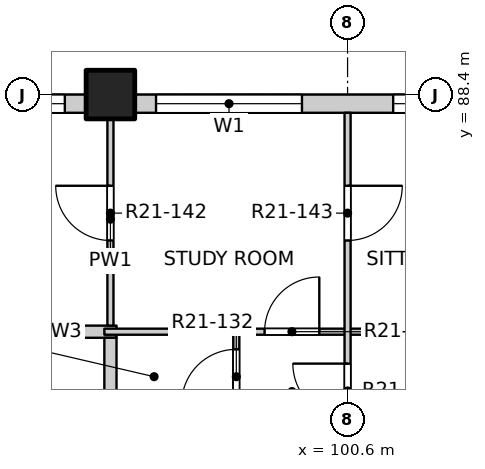
"""IFC4 building model, lengths in metres.
Left out: names, types, materials, properties, quantities, classifications, styles, units other than length and angle.
Written with IfcOpenShell. Run it as: python <this file> out.ifc"""

import sys

from ifc_helpers import new_model, si_unit, direction, frame, frame_2d, origin, origin_2d, place, context, subcontext, project, spatial, rectangle, extrude, element, fill, save


model = new_model("IFC4")
c1 = context("Model", 3, precision=1e-05, world=origin(), true_north=direction((0.0, 1.0)))
c2 = subcontext(c1, "Body", "Model", "MODEL_VIEW")
j1 = project(units=[si_unit("LENGTHUNIT", "METRE"), si_unit("PLANEANGLEUNIT", "RADIAN")], contexts=[c1])
p1 = place(None, origin())
s1 = spatial("IfcSite", under=j1, at=p1, CompositionType="ELEMENT")
p2 = place(p1, origin())
s2 = spatial("IfcBuilding", under=s1, at=p2, CompositionType="ELEMENT")
p3 = place(p2, frame((0.0, 0.0, 221.1)))
s3 = spatial("IfcBuildingStorey", under=s2, at=p3, CompositionType="ELEMENT", Elevation=221.1)
p4 = place(p3, frame((96.7, 88.4, -0.25), z_axis=(0.0, 0.0, 1.0), x_axis=(1.0, 0.0, 0.0)))
e1 = element("IfcColumn", 1, at=p4, inside=s3, PredefinedType="COLUMN", context=c2, shape_type="SweptSolid", body=[
    extrude(rectangle(XDim=0.8, YDim=0.8, at=origin_2d()), origin(), (0.0, 0.0, 1.0), 3.4),
])
p5 = place(p3, frame((73.7, 88.25, 0.0), z_axis=(0.0, 0.0, 1.0), x_axis=(1.0, 0.0, 0.0)))
e2 = element("IfcWall", 2, at=p5, inside=s3, PredefinedType="SOLIDWALL", context=c2, shape_type="SweptSolid", body=[
    extrude(rectangle(XDim=22.6, YDim=0.3, at=frame_2d((11.3, 0.0))), origin(), (0.0, 0.0, 1.0), 2.7),
])
p6 = place(p5, frame((0.35, 0.0, 0.9)))
e3 = element("IfcOpeningElement", 3, at=p6, cuts=e2, PredefinedType="OPENING", context=c2, shape_type="SweptSolid", body=[
    extrude(rectangle(XDim=2.4, YDim=1.8, at=frame_2d((1.2, 0.9))), frame((0.0, 0.16, 0.0), z_axis=(0.0, -1.0, 0.0), x_axis=(1.0, 0.0, 0.0)), (0.0, 0.0, 1.0), 0.32),
])
p7 = place(p5, frame((4.25, 0.0, 0.9)))
e4 = element("IfcOpeningElement", 4, at=p7, cuts=e2, PredefinedType="OPENING", context=c2, shape_type="SweptSolid", body=[
    extrude(rectangle(XDim=2.4, YDim=1.8, at=frame_2d((1.2, 0.9))), frame((0.0, 0.16, 0.0), z_axis=(0.0, -1.0, 0.0), x_axis=(1.0, 0.0, 0.0)), (0.0, 0.0, 1.0), 0.32),
])
p8 = place(p5, frame((8.15, 0.0, 0.9)))
e5 = element("IfcOpeningElement", 5, at=p8, cuts=e2, PredefinedType="OPENING", context=c2, shape_type="SweptSolid", body=[
    extrude(rectangle(XDim=2.4, YDim=1.8, at=frame_2d((1.2, 0.9))), frame((0.0, 0.16, 0.0), z_axis=(0.0, -1.0, 0.0), x_axis=(1.0, 0.0, 0.0)), (0.0, 0.0, 1.0), 0.32),
])
p9 = place(p5, frame((12.05, 0.0, 0.9)))
e6 = element("IfcOpeningElement", 6, at=p9, cuts=e2, PredefinedType="OPENING", context=c2, shape_type="SweptSolid", body=[
    extrude(rectangle(XDim=2.4, YDim=1.8, at=frame_2d((1.2, 0.9))), frame((0.0, 0.16, 0.0), z_axis=(0.0, -1.0, 0.0), x_axis=(1.0, 0.0, 0.0)), (0.0, 0.0, 1.0), 0.32),
])
p10 = place(p5, frame((15.95, 0.0, 0.9)))
e7 = element("IfcOpeningElement", 7, at=p10, cuts=e2, PredefinedType="OPENING", context=c2, shape_type="SweptSolid", body=[
    extrude(rectangle(XDim=2.4, YDim=1.8, at=frame_2d((1.2, 0.9))), frame((0.0, 0.16, 0.0), z_axis=(0.0, -1.0, 0.0), x_axis=(1.0, 0.0, 0.0)), (0.0, 0.0, 1.0), 0.32),
])
p11 = place(p5, frame((19.85, 0.0, 0.9)))
e8 = element("IfcOpeningElement", 8, at=p11, cuts=e2, PredefinedType="OPENING", context=c2, shape_type="SweptSolid", body=[
    extrude(rectangle(XDim=2.4, YDim=1.8, at=frame_2d((1.2, 0.9))), frame((0.0, 0.16, 0.0), z_axis=(0.0, -1.0, 0.0), x_axis=(1.0, 0.0, 0.0)), (0.0, 0.0, 1.0), 0.32),
])
p12 = place(p3, frame((97.1, 88.25, 0.0), z_axis=(0.0, 0.0, 1.0), x_axis=(1.0, 0.0, 0.0)))
e9 = element("IfcWall", 9, at=p12, inside=s3, PredefinedType="SOLIDWALL", context=c2, shape_type="SweptSolid", body=[
    extrude(rectangle(XDim=7.4, YDim=0.3, at=frame_2d((3.7, 0.0))), origin(), (0.0, 0.0, 1.0), 2.7),
])
p13 = place(p12, frame((0.35, 0.0, 0.9)))
e10 = element("IfcOpeningElement", 10, at=p13, cuts=e9, PredefinedType="OPENING", context=c2, shape_type="SweptSolid", body=[
    extrude(rectangle(XDim=2.4, YDim=1.8, at=frame_2d((1.2, 0.9))), frame((0.0, 0.16, 0.0), z_axis=(0.0, -1.0, 0.0), x_axis=(1.0, 0.0, 0.0)), (0.0, 0.0, 1.0), 0.32),
])
p14 = place(p12, frame((4.25, 0.0, 0.9)))
e11 = element("IfcOpeningElement", 11, at=p14, cuts=e9, PredefinedType="OPENING", context=c2, shape_type="SweptSolid", body=[
    extrude(rectangle(XDim=2.4, YDim=1.8, at=frame_2d((1.2, 0.9))), frame((0.0, 0.16, 0.0), z_axis=(0.0, -1.0, 0.0), x_axis=(1.0, 0.0, 0.0)), (0.0, 0.0, 1.0), 0.32),
])
p15 = place(p3, frame((94.95, 84.5, 0.0), z_axis=(0.0, 0.0, 1.0), x_axis=(1.0, 0.0, 0.0)))
e12 = element("IfcWall", 12, at=p15, inside=s3, PredefinedType="PARTITIONING", context=c2, shape_type="SweptSolid", body=[
    extrude(rectangle(XDim=1.85, YDim=0.2, at=frame_2d((0.925, 0.0))), origin(), (0.0, 0.0, 1.0), 3.15),
])
p16 = place(p3, frame((96.6, 84.5, 0.0), z_axis=(0.0, 0.0, 1.0), x_axis=(1.0, 0.0, 0.0)))
e13 = element("IfcWall", 13, at=p16, inside=s3, PredefinedType="PARTITIONING", context=c2, shape_type="SweptSolid", body=[
    extrude(rectangle(XDim=11.5, YDim=0.1, at=frame_2d((5.75, 0.0))), origin(), (0.0, 0.0, 1.0), 3.15),
])
p17 = place(p16, frame((2.635, 0.0, 0.0)))
e14 = element("IfcOpeningElement", 14, at=p17, cuts=e13, PredefinedType="OPENING", context=c2, shape_type="SweptSolid", body=[
    extrude(rectangle(XDim=0.9, YDim=2.1, at=frame_2d((0.45, 1.05))), frame((0.0, 0.06, 0.0), z_axis=(0.0, -1.0, 0.0), x_axis=(1.0, 0.0, 0.0)), (0.0, 0.0, 1.0), 0.12),
])
p18 = place(p3, frame((96.7, 49.5, 0.0), z_axis=(0.0, 0.0, 1.0), x_axis=(0.0, 1.0, 0.0)))
e15 = element("IfcWall", 15, at=p18, inside=s3, PredefinedType="PARTITIONING", context=c2, shape_type="SweptSolid", body=[
    extrude(rectangle(XDim=34.9, YDim=0.2, at=frame_2d((17.45, 0.0))), origin(), (0.0, 0.0, 1.0), 3.15),
])
p19 = place(p18, frame((3.275, 0.0, 0.0)))
e16 = element("IfcOpeningElement", 16, at=p19, cuts=e15, PredefinedType="OPENING", context=c2, shape_type="SweptSolid", body=[
    extrude(rectangle(XDim=1.0, YDim=2.1, at=frame_2d((0.5, 1.05))), frame((0.0, 0.11, 0.0), z_axis=(0.0, -1.0, 0.0), x_axis=(1.0, 0.0, 0.0)), (0.0, 0.0, 1.0), 0.22),
])
p20 = place(p18, frame((10.825, 0.0, 0.0)))
e17 = element("IfcOpeningElement", 17, at=p20, cuts=e15, PredefinedType="OPENING", context=c2, shape_type="SweptSolid", body=[
    extrude(rectangle(XDim=1.0, YDim=2.1, at=frame_2d((0.5, 1.05))), frame((0.0, 0.11, 0.0), z_axis=(0.0, -1.0, 0.0), x_axis=(1.0, 0.0, 0.0)), (0.0, 0.0, 1.0), 0.22),
])
p21 = place(p18, frame((21.575, 0.0, 0.0)))
e18 = element("IfcOpeningElement", 18, at=p21, cuts=e15, PredefinedType="OPENING", context=c2, shape_type="SweptSolid", body=[
    extrude(rectangle(XDim=1.0, YDim=2.1, at=frame_2d((0.5, 1.05))), frame((0.0, 0.11, 0.0), z_axis=(0.0, -1.0, 0.0), x_axis=(1.0, 0.0, 0.0)), (0.0, 0.0, 1.0), 0.22),
])
p22 = place(p18, frame((30.575, 0.0, 0.0)))
e19 = element("IfcOpeningElement", 19, at=p22, cuts=e15, PredefinedType="OPENING", context=c2, shape_type="SweptSolid", body=[
    extrude(rectangle(XDim=1.0, YDim=2.1, at=frame_2d((0.5, 1.05))), frame((0.0, 0.11, 0.0), z_axis=(0.0, -1.0, 0.0), x_axis=(1.0, 0.0, 0.0)), (0.0, 0.0, 1.0), 0.22),
])
p23 = place(p3, frame((96.7, 84.6, 0.0), z_axis=(0.0, 0.0, 1.0), x_axis=(0.0, 1.0, 0.0)))
e20 = element("IfcWall", 20, at=p23, inside=s3, PredefinedType="PARTITIONING", context=c2, shape_type="SweptSolid", body=[
    extrude(rectangle(XDim=3.5, YDim=0.1, at=frame_2d((1.75, 0.0))), origin(), (0.0, 0.0, 1.0), 3.15),
])
p24 = place(p23, frame((1.4, 0.0, 0.0)))
e21 = element("IfcOpeningElement", 21, at=p24, cuts=e20, PredefinedType="OPENING", context=c2, shape_type="SweptSolid", body=[
    extrude(rectangle(XDim=0.9, YDim=2.1, at=frame_2d((0.45, 1.05))), frame((0.0, 0.06, 0.0), z_axis=(0.0, -1.0, 0.0), x_axis=(1.0, 0.0, 0.0)), (0.0, 0.0, 1.0), 0.12),
])
p25 = place(p3, frame((98.77, 79.95, 0.0), z_axis=(0.0, 0.0, 1.0), x_axis=(0.0, 1.0, 0.0)))
e22 = element("IfcWall", 22, at=p25, inside=s3, PredefinedType="PARTITIONING", context=c2, shape_type="SweptSolid", body=[
    extrude(rectangle(XDim=4.5, YDim=0.1, at=frame_2d((2.25, 0.0))), origin(), (0.0, 0.0, 1.0), 3.15),
])
p26 = place(p25, frame((0.435, 0.0, 0.0)))
e23 = element("IfcOpeningElement", 23, at=p26, cuts=e22, PredefinedType="OPENING", context=c2, shape_type="SweptSolid", body=[
    extrude(rectangle(XDim=0.9, YDim=2.1, at=frame_2d((0.45, 1.05))), frame((0.0, 0.06, 0.0), z_axis=(0.0, -1.0, 0.0), x_axis=(1.0, 0.0, 0.0)), (0.0, 0.0, 1.0), 0.12),
])
p27 = place(p25, frame((2.045, 0.0, 0.0)))
e24 = element("IfcOpeningElement", 24, at=p27, cuts=e22, PredefinedType="OPENING", context=c2, shape_type="SweptSolid", body=[
    extrude(rectangle(XDim=0.8, YDim=2.1, at=frame_2d((0.4, 1.05))), frame((0.0, 0.06, 0.0), z_axis=(0.0, -1.0, 0.0), x_axis=(1.0, 0.0, 0.0)), (0.0, 0.0, 1.0), 0.12),
])
p28 = place(p25, frame((3.36, 0.0, 0.0)))
e25 = element("IfcOpeningElement", 25, at=p28, cuts=e22, PredefinedType="OPENING", context=c2, shape_type="SweptSolid", body=[
    extrude(rectangle(XDim=0.9, YDim=2.1, at=frame_2d((0.45, 1.05))), frame((0.0, 0.06, 0.0), z_axis=(0.0, -1.0, 0.0), x_axis=(1.0, 0.0, 0.0)), (0.0, 0.0, 1.0), 0.12),
])
p29 = place(p3, frame((100.6, 41.9, 0.0), z_axis=(0.0, 0.0, 1.0), x_axis=(0.0, 1.0, 0.0)))
e26 = element("IfcWall", 26, at=p29, inside=s3, PredefinedType="PARTITIONING", context=c2, shape_type="SweptSolid", body=[
    extrude(rectangle(XDim=46.2, YDim=0.1, at=frame_2d((23.1, 0.0))), origin(), (0.0, 0.0, 1.0), 3.15),
])
p30 = place(p29, frame((1.2, 0.0, 0.0)))
e27 = element("IfcOpeningElement", 27, at=p30, cuts=e26, PredefinedType="OPENING", context=c2, shape_type="SweptSolid", body=[
    extrude(rectangle(XDim=0.9, YDim=2.1, at=frame_2d((0.45, 1.05))), frame((0.0, 0.06, 0.0), z_axis=(0.0, -1.0, 0.0), x_axis=(1.0, 0.0, 0.0)), (0.0, 0.0, 1.0), 0.12),
])
p31 = place(p29, frame((6.025, 0.0, 0.0)))
e28 = element("IfcOpeningElement", 28, at=p31, cuts=e26, PredefinedType="OPENING", context=c2, shape_type="SweptSolid", body=[
    extrude(rectangle(XDim=0.9, YDim=2.1, at=frame_2d((0.45, 1.05))), frame((0.0, 0.06, 0.0), z_axis=(0.0, -1.0, 0.0), x_axis=(1.0, 0.0, 0.0)), (0.0, 0.0, 1.0), 0.12),
])
p32 = place(p29, frame((9.0, 0.0, 0.0)))
e29 = element("IfcOpeningElement", 29, at=p32, cuts=e26, PredefinedType="OPENING", context=c2, shape_type="SweptSolid", body=[
    extrude(rectangle(XDim=0.9, YDim=2.1, at=frame_2d((0.45, 1.05))), frame((0.0, 0.06, 0.0), z_axis=(0.0, -1.0, 0.0), x_axis=(1.0, 0.0, 0.0)), (0.0, 0.0, 1.0), 0.12),
])
p33 = place(p29, frame((13.85, 0.0, 0.0)))
e30 = element("IfcOpeningElement", 30, at=p33, cuts=e26, PredefinedType="OPENING", context=c2, shape_type="SweptSolid", body=[
    extrude(rectangle(XDim=0.9, YDim=2.1, at=frame_2d((0.45, 1.05))), frame((0.0, 0.06, 0.0), z_axis=(0.0, -1.0, 0.0), x_axis=(1.0, 0.0, 0.0)), (0.0, 0.0, 1.0), 0.12),
])
p34 = place(p29, frame((16.8, 0.0, 0.0)))
e31 = element("IfcOpeningElement", 31, at=p34, cuts=e26, PredefinedType="OPENING", context=c2, shape_type="SweptSolid", body=[
    extrude(rectangle(XDim=0.9, YDim=2.1, at=frame_2d((0.45, 1.05))), frame((0.0, 0.06, 0.0), z_axis=(0.0, -1.0, 0.0), x_axis=(1.0, 0.0, 0.0)), (0.0, 0.0, 1.0), 0.12),
])
p35 = place(p29, frame((21.625, 0.0, 0.0)))
e32 = element("IfcOpeningElement", 32, at=p35, cuts=e26, PredefinedType="OPENING", context=c2, shape_type="SweptSolid", body=[
    extrude(rectangle(XDim=0.9, YDim=2.1, at=frame_2d((0.45, 1.05))), frame((0.0, 0.06, 0.0), z_axis=(0.0, -1.0, 0.0), x_axis=(1.0, 0.0, 0.0)), (0.0, 0.0, 1.0), 0.12),
])
p36 = place(p29, frame((24.6, 0.0, 0.0)))
e33 = element("IfcOpeningElement", 33, at=p36, cuts=e26, PredefinedType="OPENING", context=c2, shape_type="SweptSolid", body=[
    extrude(rectangle(XDim=0.9, YDim=2.1, at=frame_2d((0.45, 1.05))), frame((0.0, 0.06, 0.0), z_axis=(0.0, -1.0, 0.0), x_axis=(1.0, 0.0, 0.0)), (0.0, 0.0, 1.0), 0.12),
])
p37 = place(p29, frame((29.425, 0.0, 0.0)))
e34 = element("IfcOpeningElement", 34, at=p37, cuts=e26, PredefinedType="OPENING", context=c2, shape_type="SweptSolid", body=[
    extrude(rectangle(XDim=0.9, YDim=2.1, at=frame_2d((0.45, 1.05))), frame((0.0, 0.06, 0.0), z_axis=(0.0, -1.0, 0.0), x_axis=(1.0, 0.0, 0.0)), (0.0, 0.0, 1.0), 0.12),
])
p38 = place(p29, frame((33.375, 0.0, 0.0)))
e35 = element("IfcOpeningElement", 35, at=p38, cuts=e26, PredefinedType="OPENING", context=c2, shape_type="SweptSolid", body=[
    extrude(rectangle(XDim=0.9, YDim=2.1, at=frame_2d((0.45, 1.05))), frame((0.0, 0.06, 0.0), z_axis=(0.0, -1.0, 0.0), x_axis=(1.0, 0.0, 0.0)), (0.0, 0.0, 1.0), 0.12),
])
p39 = place(p29, frame((36.3, 0.0, 0.0)))
e36 = element("IfcOpeningElement", 36, at=p39, cuts=e26, PredefinedType="OPENING", context=c2, shape_type="SweptSolid", body=[
    extrude(rectangle(XDim=0.9, YDim=2.1, at=frame_2d((0.45, 1.05))), frame((0.0, 0.06, 0.0), z_axis=(0.0, -1.0, 0.0), x_axis=(1.0, 0.0, 0.0)), (0.0, 0.0, 1.0), 0.12),
])
p40 = place(p29, frame((41.175, 0.0, 0.0)))
e37 = element("IfcOpeningElement", 37, at=p40, cuts=e26, PredefinedType="OPENING", context=c2, shape_type="SweptSolid", body=[
    extrude(rectangle(XDim=0.9, YDim=2.1, at=frame_2d((0.45, 1.05))), frame((0.0, 0.06, 0.0), z_axis=(0.0, -1.0, 0.0), x_axis=(1.0, 0.0, 0.0)), (0.0, 0.0, 1.0), 0.12),
])
p41 = place(p29, frame((44.1, 0.0, 0.0)))
e38 = element("IfcOpeningElement", 38, at=p41, cuts=e26, PredefinedType="OPENING", context=c2, shape_type="SweptSolid", body=[
    extrude(rectangle(XDim=0.9, YDim=2.1, at=frame_2d((0.45, 1.05))), frame((0.0, 0.06, 0.0), z_axis=(0.0, -1.0, 0.0), x_axis=(1.0, 0.0, 0.0)), (0.0, 0.0, 1.0), 0.12),
])
p42 = place(p11, origin())
e39 = element("IfcWindow", 39, at=p42, inside=s3, PartitioningType="DOUBLE_PANEL_VERTICAL", PredefinedType="WINDOW", context=c2, shape_type="SweptSolid", body=[
    extrude(rectangle(XDim=2.4, YDim=1.8, at=frame_2d((1.2, 0.9))), frame((0.0, 0.03, 0.0), z_axis=(0.0, -1.0, 0.0), x_axis=(1.0, 0.0, 0.0)), (0.0, 0.0, 1.0), 0.06),
])
fill(e8, e39)
p43 = place(p13, origin())
e40 = element("IfcWindow", 40, at=p43, inside=s3, PartitioningType="DOUBLE_PANEL_VERTICAL", PredefinedType="WINDOW", context=c2, shape_type="SweptSolid", body=[
    extrude(rectangle(XDim=2.4, YDim=1.8, at=frame_2d((1.2, 0.9))), frame((0.0, 0.03, 0.0), z_axis=(0.0, -1.0, 0.0), x_axis=(1.0, 0.0, 0.0)), (0.0, 0.0, 1.0), 0.06),
])
fill(e10, e40)
p44 = place(p14, origin())
e41 = element("IfcWindow", 41, at=p44, inside=s3, PartitioningType="DOUBLE_PANEL_VERTICAL", PredefinedType="WINDOW", context=c2, shape_type="SweptSolid", body=[
    extrude(rectangle(XDim=2.4, YDim=1.8, at=frame_2d((1.2, 0.9))), frame((0.0, 0.03, 0.0), z_axis=(0.0, -1.0, 0.0), x_axis=(1.0, 0.0, 0.0)), (0.0, 0.0, 1.0), 0.06),
])
fill(e11, e41)
p45 = place(p40, origin())
e42 = element("IfcDoor", 42, at=p45, inside=s3, OperationType="SINGLE_SWING_RIGHT", PredefinedType="DOOR", context=c2, shape_type="SweptSolid", body=[
    extrude(rectangle(XDim=0.9, YDim=2.1, at=frame_2d((0.45, 1.05))), frame((0.0, 0.025, 0.0), z_axis=(0.0, -1.0, 0.0), x_axis=(1.0, 0.0, 0.0)), (0.0, 0.0, 1.0), 0.05),
])
fill(e37, e42)
p46 = place(p28, origin())
e43 = element("IfcDoor", 43, at=p46, inside=s3, OperationType="SINGLE_SWING_LEFT", PredefinedType="DOOR", context=c2, shape_type="SweptSolid", body=[
    extrude(rectangle(XDim=0.9, YDim=2.1, at=frame_2d((0.45, 1.05))), frame((0.0, 0.025, 0.0), z_axis=(0.0, -1.0, 0.0), x_axis=(1.0, 0.0, 0.0)), (0.0, 0.0, 1.0), 0.05),
])
fill(e25, e43)
p47 = place(p17, origin())
e44 = element("IfcDoor", 44, at=p47, inside=s3, OperationType="SINGLE_SWING_RIGHT", PredefinedType="DOOR", context=c2, shape_type="SweptSolid", body=[
    extrude(rectangle(XDim=0.9, YDim=2.1, at=frame_2d((0.45, 1.05))), frame((0.0, 0.025, 0.0), z_axis=(0.0, -1.0, 0.0), x_axis=(1.0, 0.0, 0.0)), (0.0, 0.0, 1.0), 0.05),
])
fill(e14, e44)
p48 = place(p24, origin())
e45 = element("IfcDoor", 45, at=p48, inside=s3, OperationType="SINGLE_SWING_RIGHT", PredefinedType="DOOR", context=c2, shape_type="SweptSolid", body=[
    extrude(rectangle(XDim=0.9, YDim=2.1, at=frame_2d((0.45, 1.05))), frame((0.0, 0.025, 0.0), z_axis=(0.0, -1.0, 0.0), x_axis=(1.0, 0.0, 0.0)), (0.0, 0.0, 1.0), 0.05),
])
fill(e21, e45)
p49 = place(p41, origin())
e46 = element("IfcDoor", 46, at=p49, inside=s3, OperationType="SINGLE_SWING_LEFT", PredefinedType="DOOR", context=c2, shape_type="SweptSolid", body=[
    extrude(rectangle(XDim=0.9, YDim=2.1, at=frame_2d((0.45, 1.05))), frame((0.0, 0.025, 0.0), z_axis=(0.0, -1.0, 0.0), x_axis=(1.0, 0.0, 0.0)), (0.0, 0.0, 1.0), 0.05),
])
fill(e38, e46)
save(model, sys.argv[1])
